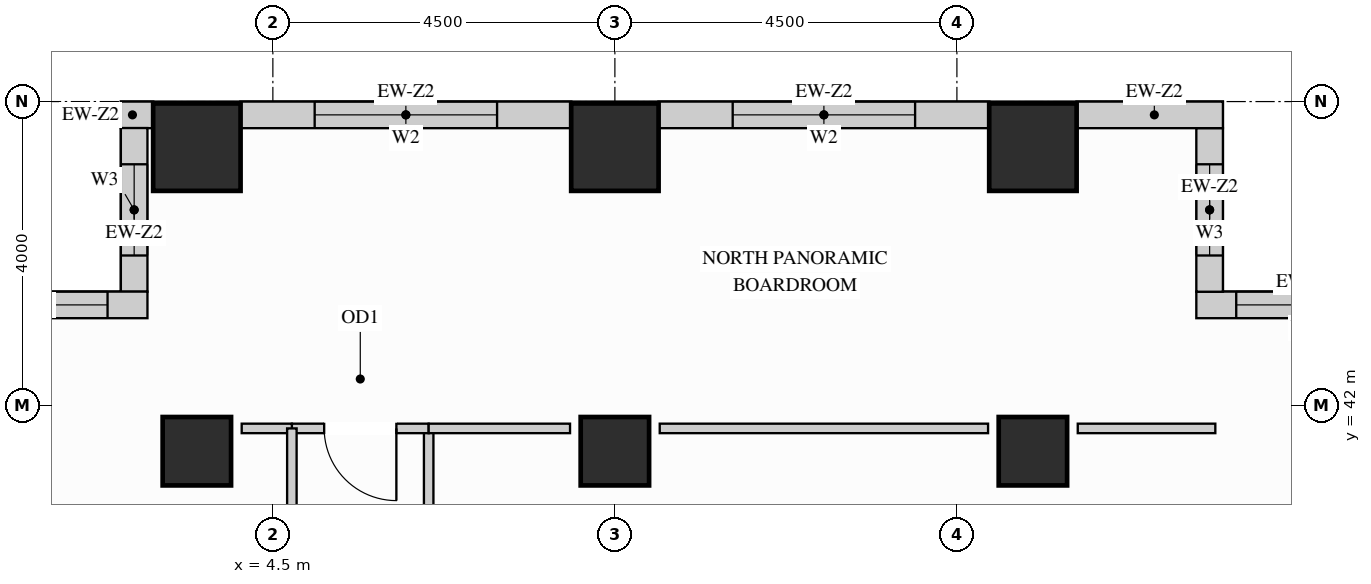
"""IFC4 building model, lengths in metres.
Left out: names, types, materials, properties, quantities, classifications, styles, units other than length and angle.
Written with IfcOpenShell. Run it as: python <this file> out.ifc"""

import sys

from ifc_helpers import new_model, si_unit, direction, frame, frame_2d, origin, origin_2d, place, context, subcontext, project, spatial, rectangle, extrude, source, transform, mapped, element, fill, save


model = new_model("IFC4")
c1 = context("Model", 3, precision=1e-05, world=origin(), true_north=direction((0.0, 1.0)))
c2 = subcontext(c1, "Body", "Model", "MODEL_VIEW")
j1 = project(units=[si_unit("LENGTHUNIT", "METRE"), si_unit("PLANEANGLEUNIT", "RADIAN")], contexts=[c1])
p1 = place(None, origin())
s1 = spatial("IfcSite", under=j1, at=p1, CompositionType="ELEMENT")
p2 = place(p1, origin())
s2 = spatial("IfcBuilding", under=s1, at=p2, CompositionType="ELEMENT")
p3 = place(p2, frame((0.0, 0.0, 109.8)))
s3 = spatial("IfcBuildingStorey", under=s2, at=p3, CompositionType="ELEMENT", Elevation=109.8)
m1 = source(origin(), c2, "Body", "SweptSolid", [
    extrude(rectangle(XDim=0.9, YDim=0.9, at=origin_2d()), origin(), (0.0, 0.0, 1.0), 3.38),
])
for number, where, z_axis, x_axis in (
    (1, (14.5, 41.4, 0.0), (0.0, 0.0, 1.0), (1.0, 0.0, 0.0)),
    (2, (3.5, 41.4, 0.0), (0.0, 0.0, 1.0), (1.0, 0.0, 0.0)),
    (3, (9.0, 41.4, 0.0), (0.0, 0.0, 1.0), (1.0, 0.0, 0.0)),
):
    element("IfcColumn", number, at=place(p3, frame(where, z_axis=z_axis, x_axis=x_axis)), inside=s3, PredefinedType="COLUMN", context=c2, shape_type="MappedRepresentation", body=[
        mapped(m1, transform((0.0, 0.0, 0.0), x_axis=(1.0, 0.0, 0.0), y_axis=(0.0, 1.0, 0.0), z_axis=(0.0, 0.0, 1.0))),
    ])
m2 = source(origin(), c2, "Body", "SweptSolid", [
    extrude(rectangle(XDim=1.15, YDim=1.15, at=origin_2d()), origin(), (0.0, 0.0, 1.0), 3.38),
])
for number, where, z_axis, x_axis in (
    (4, (14.5, 45.4, 0.0), (0.0, 0.0, 1.0), (1.0, 0.0, 0.0)),
    (5, (3.5, 45.4, 0.0), (0.0, 0.0, 1.0), (1.0, 0.0, 0.0)),
    (6, (9.0, 45.4, 0.0), (0.0, 0.0, 1.0), (1.0, 0.0, 0.0)),
):
    element("IfcColumn", number, at=place(p3, frame(where, z_axis=z_axis, x_axis=x_axis)), inside=s3, PredefinedType="COLUMN", context=c2, shape_type="MappedRepresentation", body=[
        mapped(m2, transform((0.0, 0.0, 0.0), x_axis=(1.0, 0.0, 0.0), y_axis=(0.0, 1.0, 0.0), z_axis=(0.0, 0.0, 1.0))),
    ])
p4 = place(p3, frame((19.5, 43.325, 0.0), z_axis=(0.0, 0.0, 1.0), x_axis=(-1.0, 0.0, 0.0)))
e7 = element("IfcWall", 7, at=p4, inside=s3, PredefinedType="SOLIDWALL", context=c2, shape_type="SweptSolid", body=[
    extrude(rectangle(XDim=2.85, YDim=0.35, at=frame_2d((1.425, 0.0))), origin(), (0.0, 0.0, 1.0), 3.365),
])
p5 = place(p4, frame((0.525, 0.0, 0.78)))
e8 = element("IfcOpeningElement", 8, at=p5, cuts=e7, PredefinedType="OPENING", context=c2, shape_type="SweptSolid", body=[
    extrude(rectangle(XDim=1.8, YDim=2.1, at=frame_2d((0.9, 1.05))), frame((0.0, 0.185, 0.0), z_axis=(0.0, -1.0, 0.0), x_axis=(1.0, 0.0, 0.0)), (0.0, 0.0, 1.0), 0.37),
])
p6 = place(p3, frame((16.825, 43.498, 0.0), z_axis=(0.0, 0.0, 1.0), x_axis=(0.0, 1.0, 0.0)))
e9 = element("IfcWall", 9, at=p6, inside=s3, PredefinedType="SOLIDWALL", context=c2, shape_type="SweptSolid", body=[
    extrude(rectangle(XDim=2.154, YDim=0.35, at=frame_2d((1.077, 0.0))), origin(), (0.0, 0.0, 1.0), 3.365),
])
p7 = place(p6, frame((0.477, 0.0, 0.78)))
e10 = element("IfcOpeningElement", 10, at=p7, cuts=e9, PredefinedType="OPENING", context=c2, shape_type="SweptSolid", body=[
    extrude(rectangle(XDim=1.2, YDim=2.1, at=frame_2d((0.6, 1.05))), frame((0.0, 0.185, 0.0), z_axis=(0.0, -1.0, 0.0), x_axis=(1.0, 0.0, 0.0)), (0.0, 0.0, 1.0), 0.37),
])
m3 = source(origin(), c2, "Body", "SweptSolid", [
    extrude(rectangle(XDim=1.927, YDim=0.35, at=frame_2d((0.963, 0.0))), origin(), (0.0, 0.0, 1.0), 3.365),
])
p8 = place(p3, frame((17.0, 45.825, 0.0), z_axis=(0.0, 0.0, 1.0), x_axis=(-1.0, 0.0, 0.0)))
e11 = element("IfcWall", 11, at=p8, inside=s3, PredefinedType="SOLIDWALL", context=c2, shape_type="MappedRepresentation", body=[
    mapped(m3, transform((0.0, 0.0, 0.0), x_axis=(1.0, 0.0, 0.0), y_axis=(0.0, 1.0, 0.0), z_axis=(0.0, 0.0, 1.0))),
])
p9 = place(p3, frame((13.927, 45.825, 0.0), z_axis=(0.0, 0.0, 1.0), x_axis=(-1.0, 0.0, 0.0)))
e12 = element("IfcWall", 12, at=p9, inside=s3, PredefinedType="SOLIDWALL", context=c2, shape_type="SweptSolid", body=[
    extrude(rectangle(XDim=4.354, YDim=0.35, at=frame_2d((2.177, 0.0))), origin(), (0.0, 0.0, 1.0), 3.365),
])
p10 = place(p9, frame((0.977, 0.0, 0.78)))
e13 = element("IfcOpeningElement", 13, at=p10, cuts=e12, PredefinedType="OPENING", context=c2, shape_type="SweptSolid", body=[
    extrude(rectangle(XDim=2.4, YDim=2.1, at=frame_2d((1.2, 1.05))), frame((0.0, 0.185, 0.0), z_axis=(0.0, -1.0, 0.0), x_axis=(1.0, 0.0, 0.0)), (0.0, 0.0, 1.0), 0.37),
])
p11 = place(p3, frame((8.427, 45.825, 0.0), z_axis=(0.0, 0.0, 1.0), x_axis=(-1.0, 0.0, 0.0)))
e14 = element("IfcWall", 14, at=p11, inside=s3, PredefinedType="SOLIDWALL", context=c2, shape_type="SweptSolid", body=[
    extrude(rectangle(XDim=4.354, YDim=0.35, at=frame_2d((2.177, 0.0))), origin(), (0.0, 0.0, 1.0), 3.365),
])
p12 = place(p11, frame((0.977, 0.0, 0.78)))
e15 = element("IfcOpeningElement", 15, at=p12, cuts=e14, PredefinedType="OPENING", context=c2, shape_type="SweptSolid", body=[
    extrude(rectangle(XDim=2.4, YDim=2.1, at=frame_2d((1.2, 1.05))), frame((0.0, 0.185, 0.0), z_axis=(0.0, -1.0, 0.0), x_axis=(1.0, 0.0, 0.0)), (0.0, 0.0, 1.0), 0.37),
])
m4 = source(origin(), c2, "Body", "SweptSolid", [
    extrude(rectangle(XDim=0.427, YDim=0.35, at=frame_2d((0.213, 0.0))), origin(), (0.0, 0.0, 1.0), 3.365),
])
p13 = place(p3, frame((2.927, 45.825, 0.0), z_axis=(0.0, 0.0, 1.0), x_axis=(-1.0, 0.0, 0.0)))
e16 = element("IfcWall", 16, at=p13, inside=s3, PredefinedType="SOLIDWALL", context=c2, shape_type="MappedRepresentation", body=[
    mapped(m4, transform((0.0, 0.0, 0.0), x_axis=(1.0, 0.0, 0.0), y_axis=(0.0, 1.0, 0.0), z_axis=(0.0, 0.0, 1.0))),
])
p14 = place(p3, frame((2.675, 45.652, 0.0), z_axis=(0.0, 0.0, 1.0), x_axis=(0.0, -1.0, 0.0)))
e17 = element("IfcWall", 17, at=p14, inside=s3, PredefinedType="SOLIDWALL", context=c2, shape_type="SweptSolid", body=[
    extrude(rectangle(XDim=2.154, YDim=0.35, at=frame_2d((1.077, 0.0))), origin(), (0.0, 0.0, 1.0), 3.365),
])
p15 = place(p14, frame((0.477, 0.0, 0.78)))
e18 = element("IfcOpeningElement", 18, at=p15, cuts=e17, PredefinedType="OPENING", context=c2, shape_type="SweptSolid", body=[
    extrude(rectangle(XDim=1.2, YDim=2.1, at=frame_2d((0.6, 1.05))), frame((0.0, 0.185, 0.0), z_axis=(0.0, -1.0, 0.0), x_axis=(1.0, 0.0, 0.0)), (0.0, 0.0, 1.0), 0.37),
])
p16 = place(p3, frame((2.85, 43.325, 0.0), z_axis=(0.0, 0.0, 1.0), x_axis=(-1.0, 0.0, 0.0)))
e19 = element("IfcWall", 19, at=p16, inside=s3, PredefinedType="SOLIDWALL", context=c2, shape_type="SweptSolid", body=[
    extrude(rectangle(XDim=2.85, YDim=0.35, at=frame_2d((1.425, 0.0))), origin(), (0.0, 0.0, 1.0), 3.365),
])
p17 = place(p16, frame((0.525, 0.0, 0.78)))
e20 = element("IfcOpeningElement", 20, at=p17, cuts=e19, PredefinedType="OPENING", context=c2, shape_type="SweptSolid", body=[
    extrude(rectangle(XDim=1.8, YDim=2.1, at=frame_2d((0.9, 1.05))), frame((0.0, 0.185, 0.0), z_axis=(0.0, -1.0, 0.0), x_axis=(1.0, 0.0, 0.0)), (0.0, 0.0, 1.0), 0.37),
])
p18 = place(p3, frame((6.55, 33.15, 0.0), z_axis=(0.0, 0.0, 1.0), x_axis=(0.0, 1.0, 0.0)))
e21 = element("IfcWall", 21, at=p18, inside=s3, PredefinedType="PARTITIONING", context=c2, shape_type="SweptSolid", body=[
    extrude(rectangle(XDim=8.55, YDim=0.125, at=frame_2d((4.275, 0.0))), origin(), (0.0, 0.0, 1.0), 3.365),
])
p19 = place(p18, frame((3.8, 0.0, 0.0)))
e22 = element("IfcOpeningElement", 22, at=p19, cuts=e21, PredefinedType="OPENING", context=c2, shape_type="SweptSolid", body=[
    extrude(rectangle(XDim=0.95, YDim=2.15, at=frame_2d((0.475, 1.075))), frame((0.0, 0.073, 0.0), z_axis=(0.0, -1.0, 0.0), x_axis=(1.0, 0.0, 0.0)), (0.0, 0.0, 1.0), 0.145),
])
p20 = place(p3, frame((4.75, 41.7, 0.0), z_axis=(0.0, 0.0, 1.0), x_axis=(1.0, 0.0, 0.0)))
e23 = element("IfcWall", 23, at=p20, inside=s3, PredefinedType="PARTITIONING", context=c2, shape_type="SweptSolid", body=[
    extrude(rectangle(XDim=1.8, YDim=0.125, at=frame_2d((0.9, 0.0))), origin(), (0.0, 0.0, 1.0), 3.365),
])
p21 = place(p20, frame((0.425, 0.0, 0.0)))
e24 = element("IfcOpeningElement", 24, at=p21, cuts=e23, PredefinedType="OPENING", context=c2, shape_type="SweptSolid", body=[
    extrude(rectangle(XDim=0.95, YDim=2.15, at=frame_2d((0.475, 1.075))), frame((0.0, 0.073, 0.0), z_axis=(0.0, -1.0, 0.0), x_axis=(1.0, 0.0, 0.0)), (0.0, 0.0, 1.0), 0.145),
])
m5 = source(origin(), c2, "Body", "SweptSolid", [
    extrude(rectangle(XDim=1.86, YDim=0.125, at=frame_2d((0.93, 0.0))), origin(), (0.0, 0.0, 1.0), 3.365),
])
p22 = place(p3, frame((6.55, 41.7, 0.0), z_axis=(0.0, 0.0, 1.0), x_axis=(1.0, 0.0, 0.0)))
e25 = element("IfcWall", 25, at=p22, inside=s3, PredefinedType="PARTITIONING", context=c2, shape_type="MappedRepresentation", body=[
    mapped(m5, transform((0.0, 0.0, 0.0), x_axis=(1.0, 0.0, 0.0), y_axis=(0.0, 1.0, 0.0), z_axis=(0.0, 0.0, 1.0))),
])
m6 = source(origin(), c2, "Body", "SweptSolid", [
    extrude(rectangle(XDim=4.32, YDim=0.125, at=frame_2d((2.16, 0.0))), origin(), (0.0, 0.0, 1.0), 3.365),
])
p23 = place(p3, frame((9.59, 41.7, 0.0), z_axis=(0.0, 0.0, 1.0), x_axis=(1.0, 0.0, 0.0)))
e26 = element("IfcWall", 26, at=p23, inside=s3, PredefinedType="PARTITIONING", context=c2, shape_type="MappedRepresentation", body=[
    mapped(m6, transform((0.0, 0.0, 0.0), x_axis=(1.0, 0.0, 0.0), y_axis=(0.0, 1.0, 0.0), z_axis=(0.0, 0.0, 1.0))),
])
m7 = source(origin(), c2, "Body", "SweptSolid", [
    extrude(rectangle(XDim=1.81, YDim=0.125, at=frame_2d((0.905, 0.0))), origin(), (0.0, 0.0, 1.0), 3.365),
])
p24 = place(p3, frame((15.09, 41.7, 0.0), z_axis=(0.0, 0.0, 1.0), x_axis=(1.0, 0.0, 0.0)))
e27 = element("IfcWall", 27, at=p24, inside=s3, PredefinedType="PARTITIONING", context=c2, shape_type="MappedRepresentation", body=[
    mapped(m7, transform((0.0, 0.0, 0.0), x_axis=(1.0, 0.0, 0.0), y_axis=(0.0, 1.0, 0.0), z_axis=(0.0, 0.0, 1.0))),
])
m8 = source(origin(), c2, "Body", "SweptSolid", [
    extrude(rectangle(XDim=0.66, YDim=0.125, at=frame_2d((0.33, 0.0))), origin(), (0.0, 0.0, 1.0), 3.365),
])
p25 = place(p3, frame((4.09, 41.7, 0.0), z_axis=(0.0, 0.0, 1.0), x_axis=(1.0, 0.0, 0.0)))
e28 = element("IfcWall", 28, at=p25, inside=s3, PredefinedType="PARTITIONING", context=c2, shape_type="MappedRepresentation", body=[
    mapped(m8, transform((0.0, 0.0, 0.0), x_axis=(1.0, 0.0, 0.0), y_axis=(0.0, 1.0, 0.0), z_axis=(0.0, 0.0, 1.0))),
])
p26 = place(p3, frame((4.75, 37.596, 0.0), z_axis=(0.0, 0.0, 1.0), x_axis=(0.0, 1.0, 0.0)))
e29 = element("IfcWall", 29, at=p26, inside=s3, PredefinedType="PARTITIONING", context=c2, shape_type="SweptSolid", body=[
    extrude(rectangle(XDim=4.104, YDim=0.125, at=frame_2d((2.052, 0.0))), origin(), (0.0, 0.0, 1.0), 3.365),
])
p27 = place(p26, frame((1.577, 0.0, 0.0)))
e30 = element("IfcOpeningElement", 30, at=p27, cuts=e29, PredefinedType="OPENING", context=c2, shape_type="SweptSolid", body=[
    extrude(rectangle(XDim=0.95, YDim=2.15, at=frame_2d((0.475, 1.075))), frame((0.0, 0.073, 0.0), z_axis=(0.0, -1.0, 0.0), x_axis=(1.0, 0.0, 0.0)), (0.0, 0.0, 1.0), 0.145),
])
m9 = source(origin(), c2, "Body", "SweptSolid", [
    extrude(rectangle(XDim=0.95, YDim=2.15, at=frame_2d((0.475, 1.075))), frame((0.0, 0.025, 0.0), z_axis=(0.0, -1.0, 0.0), x_axis=(1.0, 0.0, 0.0)), (0.0, 0.0, 1.0), 0.05),
])
p28 = place(p21, origin())
e31 = element("IfcDoor", 31, at=p28, inside=s3, OperationType="SINGLE_SWING_RIGHT", PredefinedType="DOOR", context=c2, shape_type="MappedRepresentation", body=[
    mapped(m9, transform((0.0, 0.0, 0.0), x_axis=(1.0, 0.0, 0.0), y_axis=(0.0, 1.0, 0.0), z_axis=(0.0, 0.0, 1.0))),
])
fill(e24, e31)
m10 = source(origin(), c2, "Body", "SweptSolid", [
    extrude(rectangle(XDim=1.8, YDim=2.1, at=frame_2d((0.9, 1.05))), frame((0.0, 0.03, 0.0), z_axis=(0.0, -1.0, 0.0), x_axis=(1.0, 0.0, 0.0)), (0.0, 0.0, 1.0), 0.06),
])
p29 = place(p5, origin())
e32 = element("IfcWindow", 32, at=p29, inside=s3, PartitioningType="SINGLE_PANEL", PredefinedType="WINDOW", context=c2, shape_type="MappedRepresentation", body=[
    mapped(m10, transform((0.0, 0.0, 0.0), x_axis=(1.0, 0.0, 0.0), y_axis=(0.0, 1.0, 0.0), z_axis=(0.0, 0.0, 1.0))),
])
fill(e8, e32)
p30 = place(p17, origin())
e33 = element("IfcWindow", 33, at=p30, inside=s3, PartitioningType="SINGLE_PANEL", PredefinedType="WINDOW", context=c2, shape_type="MappedRepresentation", body=[
    mapped(m10, transform((0.0, 0.0, 0.0), x_axis=(1.0, 0.0, 0.0), y_axis=(0.0, 1.0, 0.0), z_axis=(0.0, 0.0, 1.0))),
])
fill(e20, e33)
m11 = source(origin(), c2, "Body", "SweptSolid", [
    extrude(rectangle(XDim=2.4, YDim=2.1, at=frame_2d((1.2, 1.05))), frame((0.0, 0.03, 0.0), z_axis=(0.0, -1.0, 0.0), x_axis=(1.0, 0.0, 0.0)), (0.0, 0.0, 1.0), 0.06),
])
p31 = place(p10, origin())
e34 = element("IfcWindow", 34, at=p31, inside=s3, PartitioningType="SINGLE_PANEL", PredefinedType="WINDOW", context=c2, shape_type="MappedRepresentation", body=[
    mapped(m11, transform((0.0, 0.0, 0.0), x_axis=(1.0, 0.0, 0.0), y_axis=(0.0, 1.0, 0.0), z_axis=(0.0, 0.0, 1.0))),
])
fill(e13, e34)
p32 = place(p12, origin())
e35 = element("IfcWindow", 35, at=p32, inside=s3, PartitioningType="SINGLE_PANEL", PredefinedType="WINDOW", context=c2, shape_type="MappedRepresentation", body=[
    mapped(m11, transform((0.0, 0.0, 0.0), x_axis=(1.0, 0.0, 0.0), y_axis=(0.0, 1.0, 0.0), z_axis=(0.0, 0.0, 1.0))),
])
fill(e15, e35)
m12 = source(origin(), c2, "Body", "SweptSolid", [
    extrude(rectangle(XDim=1.2, YDim=2.1, at=frame_2d((0.6, 1.05))), frame((0.0, 0.03, 0.0), z_axis=(0.0, -1.0, 0.0), x_axis=(1.0, 0.0, 0.0)), (0.0, 0.0, 1.0), 0.06),
])
p33 = place(p7, origin())
e36 = element("IfcWindow", 36, at=p33, inside=s3, PartitioningType="SINGLE_PANEL", PredefinedType="WINDOW", context=c2, shape_type="MappedRepresentation", body=[
    mapped(m12, transform((0.0, 0.0, 0.0), x_axis=(1.0, 0.0, 0.0), y_axis=(0.0, 1.0, 0.0), z_axis=(0.0, 0.0, 1.0))),
])
fill(e10, e36)
p34 = place(p15, origin())
e37 = element("IfcWindow", 37, at=p34, inside=s3, PartitioningType="SINGLE_PANEL", PredefinedType="WINDOW", context=c2, shape_type="MappedRepresentation", body=[
    mapped(m12, transform((0.0, 0.0, 0.0), x_axis=(1.0, 0.0, 0.0), y_axis=(0.0, 1.0, 0.0), z_axis=(0.0, 0.0, 1.0))),
])
fill(e18, e37)
save(model, sys.argv[1])
